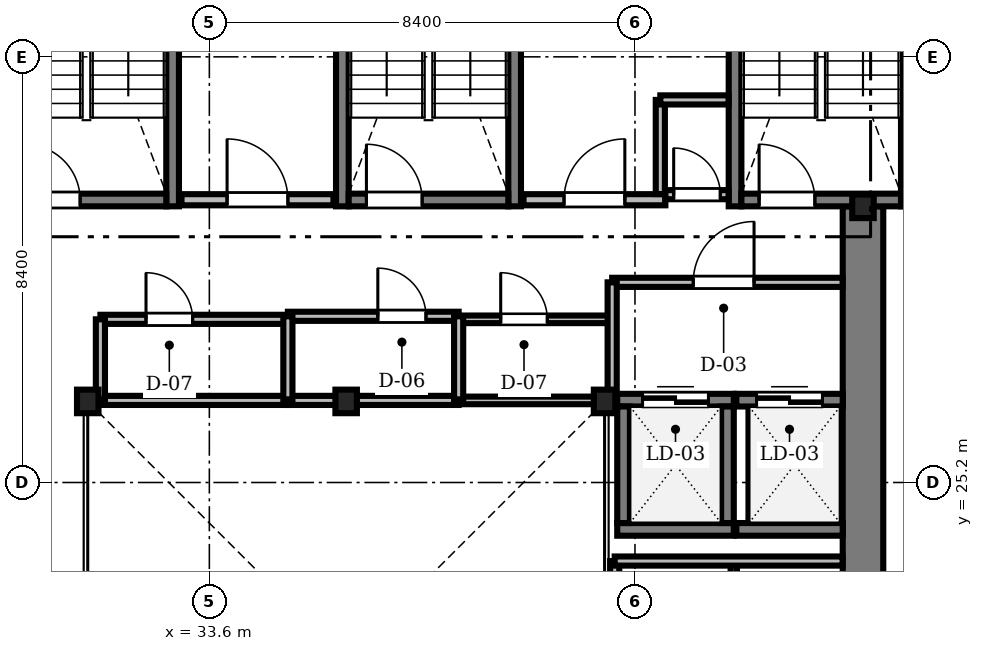
"""IFC4 building model, lengths in metres.
Left out: names, types, materials, properties, quantities, classifications, styles, units other than length and angle.
Written with IfcOpenShell. Run it as: python <this file> out.ifc"""

import sys

from ifc_helpers import new_model, si_unit, direction, frame, frame_2d, origin, origin_2d, place, context, subcontext, project, spatial, rectangle, i_section, extrude, source, transform, mapped, element, fill, save


model = new_model("IFC4")
c1 = context("Model", 3, precision=1e-05, world=origin(), true_north=direction((0.0, 1.0)))
c2 = subcontext(c1, "Body", "Model", "MODEL_VIEW")
j1 = project(units=[si_unit("LENGTHUNIT", "METRE"), si_unit("PLANEANGLEUNIT", "RADIAN")], contexts=[c1])
p1 = place(None, origin())
s1 = spatial("IfcSite", under=j1, at=p1, CompositionType="ELEMENT")
p2 = place(p1, origin())
s2 = spatial("IfcBuilding", under=s1, at=p2, CompositionType="ELEMENT")
p3 = place(p2, frame((0.0, 0.0, 159.4)))
s3 = spatial("IfcBuildingStorey", under=s2, at=p3, CompositionType="ELEMENT", Elevation=159.4)
m1 = source(origin(), c2, "Body", "SweptSolid", [
    extrude(rectangle(XDim=13.15, YDim=0.8, at=frame_2d((6.575, 0.0))), origin(), (0.0, 0.0, 1.0), 3.46),
])
p4 = place(p3, frame((46.5, 17.5, 0.0), z_axis=(0.0, 0.0, 1.0), x_axis=(0.0, 1.0, 0.0)))
e1 = element("IfcWall", 1, at=p4, inside=s3, PredefinedType="SHEAR", context=c2, shape_type="MappedRepresentation", body=[
    mapped(m1, transform((0.0, 0.0, 0.0), scale=1.0)),
])
m2 = source(origin(), c2, "Body", "SweptSolid", [
    extrude(i_section(OverallWidth=0.424, OverallDepth=0.465, WebThickness=0.035, FlangeThickness=0.056, FilletRadius=0.015, at=origin_2d()), origin(), (0.0, 0.0, 1.0), 3.46),
])
for number, where, z_axis, x_axis in (
    (2, (41.4, 26.8, 0.0), (0.0, 0.0, 1.0), (1.0, 0.0, 0.0)),
    (3, (36.3, 26.8, 0.0), (0.0, 0.0, 1.0), (1.0, 0.0, 0.0)),
    (4, (31.2, 26.8, 0.0), (0.0, 0.0, 1.0), (1.0, 0.0, 0.0)),
    (5, (46.5, 30.65, 0.0), (0.0, 0.0, 1.0), (1.0, 0.0, 0.0)),
):
    element("IfcColumn", number, at=place(p3, frame(where, z_axis=z_axis, x_axis=x_axis)), inside=s3, PredefinedType="COLUMN", context=c2, shape_type="MappedRepresentation", body=[
        mapped(m2, transform((0.0, 0.0, 0.0), scale=1.0)),
    ])
m3 = source(origin(), c2, "Body", "SweptSolid", [
    extrude(rectangle(XDim=9.25, YDim=0.25, at=frame_2d((4.625, 0.0))), origin(), (0.0, 0.0, 1.0), 3.5),
])
p5 = place(p3, frame((32.875, 30.65, 0.0), z_axis=(0.0, 0.0, 1.0), x_axis=(0.0, 1.0, 0.0)))
e6 = element("IfcWall", 6, at=p5, inside=s3, PredefinedType="SOLIDWALL", context=c2, shape_type="MappedRepresentation", body=[
    mapped(m3, transform((0.0, 0.0, 0.0), scale=1.0)),
])
m4 = source(origin(), c2, "Body", "SweptSolid", [
    extrude(rectangle(XDim=3.15, YDim=0.25, at=frame_2d((1.575, 0.0))), origin(), (0.0, 0.0, 1.0), 3.5),
])
p6 = place(p3, frame((29.6, 30.775, 0.0), z_axis=(0.0, 0.0, 1.0), x_axis=(1.0, 0.0, 0.0)))
e7 = element("IfcWall", 7, at=p6, inside=s3, PredefinedType="SOLIDWALL", context=c2, shape_type="MappedRepresentation", body=[
    mapped(m4, transform((0.0, 0.0, 0.0), scale=1.0)),
])
m5 = source(origin(), c2, "Body", "SweptSolid", [
    extrude(rectangle(XDim=1.1, YDim=2.2, at=frame_2d((0.55, 1.1))), frame((0.0, 0.135, 0.0), z_axis=(0.0, -1.0, 0.0), x_axis=(1.0, 0.0, 0.0)), (0.0, 0.0, 1.0), 0.27),
])
p7 = place(p6, frame((0.35, 0.0, 0.0)))
e8 = element("IfcOpeningElement", 8, at=p7, cuts=e7, PredefinedType="OPENING", context=c2, shape_type="MappedRepresentation", body=[
    mapped(m5, transform((0.0, 0.0, 0.0), scale=1.0)),
])
for number, where, z_axis, x_axis in (
    (9, (36.225, 30.65, 0.0), (0.0, 0.0, 1.0), (0.0, 1.0, 0.0)),
    (10, (39.625, 30.65, 0.0), (0.0, 0.0, 1.0), (0.0, 1.0, 0.0)),
):
    element("IfcWall", number, at=place(p3, frame(where, z_axis=z_axis, x_axis=x_axis)), inside=s3, PredefinedType="SOLIDWALL", context=c2, shape_type="MappedRepresentation", body=[
        mapped(m3, transform((0.0, 0.0, 0.0), scale=1.0)),
    ])
p8 = place(p3, frame((36.35, 30.775, 0.0), z_axis=(0.0, 0.0, 1.0), x_axis=(1.0, 0.0, 0.0)))
e11 = element("IfcWall", 11, at=p8, inside=s3, PredefinedType="SOLIDWALL", context=c2, shape_type="MappedRepresentation", body=[
    mapped(m4, transform((0.0, 0.0, 0.0), scale=1.0)),
])
p9 = place(p8, frame((0.35, 0.0, 0.0)))
e12 = element("IfcOpeningElement", 12, at=p9, cuts=e11, PredefinedType="OPENING", context=c2, shape_type="MappedRepresentation", body=[
    mapped(m5, transform((0.0, 0.0, 0.0), scale=1.0)),
])
for number, where, z_axis, x_axis in (
    (13, (43.975, 30.65, 0.0), (0.0, 0.0, 1.0), (0.0, 1.0, 0.0)),
    (14, (47.375, 30.65, 0.0), (0.0, 0.0, 1.0), (0.0, 1.0, 0.0)),
):
    element("IfcWall", number, at=place(p3, frame(where, z_axis=z_axis, x_axis=x_axis)), inside=s3, PredefinedType="SOLIDWALL", context=c2, shape_type="MappedRepresentation", body=[
        mapped(m3, transform((0.0, 0.0, 0.0), scale=1.0)),
    ])
p10 = place(p3, frame((44.1, 30.775, 0.0), z_axis=(0.0, 0.0, 1.0), x_axis=(1.0, 0.0, 0.0)))
e15 = element("IfcWall", 15, at=p10, inside=s3, PredefinedType="SOLIDWALL", context=c2, shape_type="MappedRepresentation", body=[
    mapped(m4, transform((0.0, 0.0, 0.0), scale=1.0)),
])
p11 = place(p10, frame((0.35, 0.0, 0.0)))
e16 = element("IfcOpeningElement", 16, at=p11, cuts=e15, PredefinedType="OPENING", context=c2, shape_type="MappedRepresentation", body=[
    mapped(m5, transform((0.0, 0.0, 0.0), scale=1.0)),
])
m6 = source(origin(), c2, "Body", "SweptSolid", [
    extrude(rectangle(XDim=3.0, YDim=0.22, at=frame_2d((1.5, 0.0))), origin(), (0.0, 0.0, 1.0), 3.46),
])
p12 = place(p3, frame((33.05, 30.78, 0.0), z_axis=(0.0, 0.0, 1.0), x_axis=(1.0, 0.0, 0.0)))
e17 = element("IfcWall", 17, at=p12, inside=s3, PredefinedType="SOLIDWALL", context=c2, shape_type="MappedRepresentation", body=[
    mapped(m6, transform((0.0, 0.0, 0.0), scale=1.0)),
])
m7 = source(origin(), c2, "Body", "SweptSolid", [
    extrude(rectangle(XDim=1.2, YDim=2.2, at=frame_2d((0.6, 1.1))), frame((0.0, 0.12, 0.0), z_axis=(0.0, -1.0, 0.0), x_axis=(1.0, 0.0, 0.0)), (0.0, 0.0, 1.0), 0.24),
])
p13 = place(p12, frame((0.9, 0.0, 0.0)))
e18 = element("IfcOpeningElement", 18, at=p13, cuts=e17, PredefinedType="OPENING", context=c2, shape_type="MappedRepresentation", body=[
    mapped(m7, transform((0.0, 0.0, 0.0), scale=1.0)),
])
m8 = source(origin(), c2, "Body", "SweptSolid", [
    extrude(rectangle(XDim=2.8, YDim=0.22, at=frame_2d((1.4, 0.0))), origin(), (0.0, 0.0, 1.0), 3.46),
])
p14 = place(p3, frame((39.8, 30.78, 0.0), z_axis=(0.0, 0.0, 1.0), x_axis=(1.0, 0.0, 0.0)))
e19 = element("IfcWall", 19, at=p14, inside=s3, PredefinedType="SOLIDWALL", context=c2, shape_type="MappedRepresentation", body=[
    mapped(m8, transform((0.0, 0.0, 0.0), scale=1.0)),
])
p15 = place(p14, frame((0.8, 0.0, 0.0)))
e20 = element("IfcOpeningElement", 20, at=p15, cuts=e19, PredefinedType="OPENING", context=c2, shape_type="MappedRepresentation", body=[
    mapped(m7, transform((0.0, 0.0, 0.0), scale=1.0)),
])
m9 = source(origin(), c2, "Body", "SweptSolid", [
    extrude(rectangle(XDim=2.3, YDim=0.25, at=frame_2d((1.15, 0.0))), origin(), (0.0, 0.0, 1.0), 3.46),
])
p16 = place(p3, frame((41.65, 24.275, 0.0), z_axis=(0.0, 0.0, 1.0), x_axis=(1.0, 0.0, 0.0)))
e21 = element("IfcWall", 21, at=p16, inside=s3, PredefinedType="SOLIDWALL", context=c2, shape_type="MappedRepresentation", body=[
    mapped(m9, transform((0.0, 0.0, 0.0), scale=1.0)),
])
p17 = place(p3, frame((41.65, 26.825, 0.0), z_axis=(0.0, 0.0, 1.0), x_axis=(1.0, 0.0, 0.0)))
e22 = element("IfcWall", 22, at=p17, inside=s3, PredefinedType="SOLIDWALL", context=c2, shape_type="MappedRepresentation", body=[
    mapped(m9, transform((0.0, 0.0, 0.0), scale=1.0)),
])
m10 = source(origin(), c2, "Body", "SweptSolid", [
    extrude(rectangle(XDim=1.3, YDim=2.3, at=frame_2d((0.65, 1.15))), frame((0.0, 0.135, 0.0), z_axis=(0.0, -1.0, 0.0), x_axis=(1.0, 0.0, 0.0)), (0.0, 0.0, 1.0), 0.27),
])
p18 = place(p17, frame((0.5, 0.0, 0.0)))
e23 = element("IfcOpeningElement", 23, at=p18, cuts=e22, PredefinedType="OPENING", context=c2, shape_type="MappedRepresentation", body=[
    mapped(m10, transform((0.0, 0.0, 0.0), scale=1.0)),
])
for number, where, z_axis, x_axis in (
    (24, (41.775, 24.4, 0.0), (0.0, 0.0, 1.0), (0.0, 1.0, 0.0)),
    (25, (43.825, 24.4, 0.0), (0.0, 0.0, 1.0), (0.0, 1.0, 0.0)),
):
    element("IfcWall", number, at=place(p3, frame(where, z_axis=z_axis, x_axis=x_axis)), inside=s3, PredefinedType="SOLIDWALL", context=c2, shape_type="MappedRepresentation", body=[
        mapped(m9, transform((0.0, 0.0, 0.0), scale=1.0)),
    ])
m11 = source(origin(), c2, "Body", "SweptSolid", [
    extrude(rectangle(XDim=2.1, YDim=0.25, at=frame_2d((1.05, 0.0))), origin(), (0.0, 0.0, 1.0), 3.46),
])
p19 = place(p3, frame((44.0, 24.275, 0.0), z_axis=(0.0, 0.0, 1.0), x_axis=(1.0, 0.0, 0.0)))
e26 = element("IfcWall", 26, at=p19, inside=s3, PredefinedType="SOLIDWALL", context=c2, shape_type="MappedRepresentation", body=[
    mapped(m11, transform((0.0, 0.0, 0.0), scale=1.0)),
])
p20 = place(p3, frame((44.0, 26.825, 0.0), z_axis=(0.0, 0.0, 1.0), x_axis=(1.0, 0.0, 0.0)))
e27 = element("IfcWall", 27, at=p20, inside=s3, PredefinedType="SOLIDWALL", context=c2, shape_type="MappedRepresentation", body=[
    mapped(m11, transform((0.0, 0.0, 0.0), scale=1.0)),
])
p21 = place(p20, frame((0.4, 0.0, 0.0)))
e28 = element("IfcOpeningElement", 28, at=p21, cuts=e27, PredefinedType="OPENING", context=c2, shape_type="MappedRepresentation", body=[
    mapped(m10, transform((0.0, 0.0, 0.0), scale=1.0)),
])
m12 = source(origin(), c2, "Body", "SweptSolid", [
    extrude(rectangle(XDim=4.548, YDim=0.18, at=frame_2d((2.274, 0.0))), origin(), (0.0, 0.0, 1.0), 3.092),
])
p22 = place(p3, frame((41.55, 29.15, 0.0), z_axis=(0.0, 0.0, 1.0), x_axis=(1.0, 0.0, 0.0)))
e29 = element("IfcWall", 29, at=p22, inside=s3, PredefinedType="PARTITIONING", context=c2, shape_type="MappedRepresentation", body=[
    mapped(m12, transform((0.0, 0.0, 0.0), scale=1.0)),
])
m13 = source(origin(), c2, "Body", "SweptSolid", [
    extrude(rectangle(XDim=1.2, YDim=2.2, at=frame_2d((0.6, 1.1))), frame((0.0, 0.1, 0.0), z_axis=(0.0, -1.0, 0.0), x_axis=(1.0, 0.0, 0.0)), (0.0, 0.0, 1.0), 0.2),
])
p23 = place(p22, frame((1.6, 0.0, 0.0)))
e30 = element("IfcOpeningElement", 30, at=p23, cuts=e29, PredefinedType="OPENING", context=c2, shape_type="MappedRepresentation", body=[
    mapped(m13, transform((0.0, 0.0, 0.0), scale=1.0)),
])
m14 = source(origin(), c2, "Body", "SweptSolid", [
    extrude(rectangle(XDim=3.7, YDim=0.18, at=frame_2d((1.85, 0.0))), origin(), (0.0, 0.0, 1.0), 3.092),
])
p24 = place(p3, frame((31.45, 28.42, 0.0), z_axis=(0.0, 0.0, 1.0), x_axis=(1.0, 0.0, 0.0)))
e31 = element("IfcWall", 31, at=p24, inside=s3, PredefinedType="PARTITIONING", context=c2, shape_type="MappedRepresentation", body=[
    mapped(m14, transform((0.0, 0.0, 0.0), scale=1.0)),
])
m15 = source(origin(), c2, "Body", "SweptSolid", [
    extrude(rectangle(XDim=0.92, YDim=2.1, at=frame_2d((0.46, 1.05))), frame((0.0, 0.1, 0.0), z_axis=(0.0, -1.0, 0.0), x_axis=(1.0, 0.0, 0.0)), (0.0, 0.0, 1.0), 0.2),
])
p25 = place(p24, frame((0.9, 0.0, 0.0)))
e32 = element("IfcOpeningElement", 32, at=p25, cuts=e31, PredefinedType="OPENING", context=c2, shape_type="MappedRepresentation", body=[
    mapped(m15, transform((0.0, 0.0, 0.0), scale=1.0)),
])
m16 = source(origin(), c2, "Body", "SweptSolid", [
    extrude(rectangle(XDim=3.37, YDim=0.18, at=frame_2d((1.685, 0.0))), origin(), (0.0, 0.0, 1.0), 3.46),
])
p26 = place(p3, frame((35.15, 28.48, 0.0), z_axis=(0.0, 0.0, 1.0), x_axis=(1.0, 0.0, 0.0)))
e33 = element("IfcWall", 33, at=p26, inside=s3, PredefinedType="PARTITIONING", context=c2, shape_type="MappedRepresentation", body=[
    mapped(m16, transform((0.0, 0.0, 0.0), scale=1.0)),
])
m17 = source(origin(), c2, "Body", "SweptSolid", [
    extrude(rectangle(XDim=0.95, YDim=2.15, at=frame_2d((0.475, 1.075))), frame((0.0, 0.1, 0.0), z_axis=(0.0, -1.0, 0.0), x_axis=(1.0, 0.0, 0.0)), (0.0, 0.0, 1.0), 0.2),
])
p27 = place(p26, frame((1.775, 0.0, 0.0)))
e34 = element("IfcOpeningElement", 34, at=p27, cuts=e33, PredefinedType="OPENING", context=c2, shape_type="MappedRepresentation", body=[
    mapped(m17, transform((0.0, 0.0, 0.0), scale=1.0)),
])
m18 = source(origin(), c2, "Body", "SweptSolid", [
    extrude(rectangle(XDim=3.0, YDim=0.15, at=frame_2d((1.5, 0.0))), origin(), (0.0, 0.0, 1.0), 3.46),
])
p28 = place(p3, frame((38.52, 28.42, 0.0), z_axis=(0.0, 0.0, 1.0), x_axis=(1.0, 0.0, 0.0)))
e35 = element("IfcWall", 35, at=p28, inside=s3, PredefinedType="PARTITIONING", context=c2, shape_type="MappedRepresentation", body=[
    mapped(m18, transform((0.0, 0.0, 0.0), scale=1.0)),
])
m19 = source(origin(), c2, "Body", "SweptSolid", [
    extrude(rectangle(XDim=0.92, YDim=2.1, at=frame_2d((0.46, 1.05))), frame((0.0, 0.085, 0.0), z_axis=(0.0, -1.0, 0.0), x_axis=(1.0, 0.0, 0.0)), (0.0, 0.0, 1.0), 0.17),
])
p29 = place(p28, frame((0.83, 0.0, 0.0)))
e36 = element("IfcOpeningElement", 36, at=p29, cuts=e35, PredefinedType="OPENING", context=c2, shape_type="MappedRepresentation", body=[
    mapped(m19, transform((0.0, 0.0, 0.0), scale=1.0)),
])
m20 = source(origin(), c2, "Body", "SweptSolid", [
    extrude(rectangle(XDim=1.248, YDim=0.18, at=frame_2d((0.624, 0.0))), origin(), (0.0, 0.0, 1.0), 3.46),
])
p30 = place(p3, frame((42.6, 30.88, 0.0), z_axis=(0.0, 0.0, 1.0), x_axis=(1.0, 0.0, 0.0)))
e37 = element("IfcWall", 37, at=p30, inside=s3, PredefinedType="PARTITIONING", context=c2, shape_type="MappedRepresentation", body=[
    mapped(m20, transform((0.0, 0.0, 0.0), scale=1.0)),
])
p31 = place(p30, frame((0.164, 0.0, 0.0)))
e38 = element("IfcOpeningElement", 38, at=p31, cuts=e37, PredefinedType="OPENING", context=c2, shape_type="MappedRepresentation", body=[
    mapped(m15, transform((0.0, 0.0, 0.0), scale=1.0)),
])
m21 = source(origin(), c2, "Body", "SweptSolid", [
    extrude(rectangle(XDim=7.15, YDim=0.18, at=frame_2d((3.575, 0.0))), origin(), (0.0, 0.0, 1.0), 2.852),
])
p32 = place(p3, frame((41.6, 16.5, 0.0), z_axis=(0.0, 0.0, 1.0), x_axis=(0.0, 1.0, 0.0)))
e39 = element("IfcWall", 39, at=p32, inside=s3, PredefinedType="PARTITIONING", context=c2, shape_type="MappedRepresentation", body=[
    mapped(m21, transform((0.0, 0.0, 0.0), scale=1.0)),
])
m22 = source(origin(), c2, "Body", "SweptSolid", [
    extrude(rectangle(XDim=7.15, YDim=0.125, at=frame_2d((3.575, 0.0))), origin(), (0.0, 0.0, 1.0), 2.852),
])
p33 = place(p3, frame((43.95, 16.5, 0.0), z_axis=(0.0, 0.0, 1.0), x_axis=(0.0, 1.0, 0.0)))
e40 = element("IfcWall", 40, at=p33, inside=s3, PredefinedType="PARTITIONING", context=c2, shape_type="MappedRepresentation", body=[
    mapped(m22, transform((0.0, 0.0, 0.0), scale=1.0)),
])
m23 = source(origin(), c2, "Body", "SweptSolid", [
    extrude(rectangle(XDim=4.498, YDim=0.18, at=frame_2d((2.249, 0.0))), origin(), (0.0, 0.0, 1.0), 3.46),
])
p34 = place(p3, frame((41.6, 23.65, 0.0), z_axis=(0.0, 0.0, 1.0), x_axis=(1.0, 0.0, 0.0)))
e41 = element("IfcWall", 41, at=p34, inside=s3, PredefinedType="PARTITIONING", context=c2, shape_type="MappedRepresentation", body=[
    mapped(m23, transform((0.0, 0.0, 0.0), scale=1.0)),
])
m24 = source(origin(), c2, "Body", "SweptSolid", [
    extrude(rectangle(XDim=3.7, YDim=0.18, at=frame_2d((1.85, 0.0))), origin(), (0.0, 0.0, 1.0), 3.002),
])
p35 = place(p3, frame((31.45, 26.82, 0.0), z_axis=(0.0, 0.0, 1.0), x_axis=(1.0, 0.0, 0.0)))
e42 = element("IfcWall", 42, at=p35, inside=s3, PredefinedType="PARTITIONING", context=c2, shape_type="MappedRepresentation", body=[
    mapped(m24, transform((0.0, 0.0, 0.0), scale=1.0)),
])
m25 = source(origin(), c2, "Body", "SweptSolid", [
    extrude(rectangle(XDim=3.37, YDim=0.18, at=frame_2d((1.685, 0.0))), origin(), (0.0, 0.0, 1.0), 3.002),
])
p36 = place(p3, frame((35.15, 26.82, 0.0), z_axis=(0.0, 0.0, 1.0), x_axis=(1.0, 0.0, 0.0)))
e43 = element("IfcWall", 43, at=p36, inside=s3, PredefinedType="PARTITIONING", context=c2, shape_type="MappedRepresentation", body=[
    mapped(m25, transform((0.0, 0.0, 0.0), scale=1.0)),
])
m26 = source(origin(), c2, "Body", "SweptSolid", [
    extrude(rectangle(XDim=3.0, YDim=0.15, at=frame_2d((1.5, 0.0))), origin(), (0.0, 0.0, 1.0), 2.852),
])
p37 = place(p3, frame((38.52, 26.82, 0.0), z_axis=(0.0, 0.0, 1.0), x_axis=(1.0, 0.0, 0.0)))
e44 = element("IfcWall", 44, at=p37, inside=s3, PredefinedType="PARTITIONING", context=c2, shape_type="MappedRepresentation", body=[
    mapped(m26, transform((0.0, 0.0, 0.0), scale=1.0)),
])
m27 = source(origin(), c2, "Body", "SweptSolid", [
    extrude(rectangle(XDim=2.35, YDim=0.18, at=frame_2d((1.175, 0.0))), origin(), (0.0, 0.0, 1.0), 2.852),
])
p38 = place(p3, frame((41.55, 26.8, 0.0), z_axis=(0.0, 0.0, 1.0), x_axis=(0.0, 1.0, 0.0)))
e45 = element("IfcWall", 45, at=p38, inside=s3, PredefinedType="PARTITIONING", context=c2, shape_type="MappedRepresentation", body=[
    mapped(m27, transform((0.0, 0.0, 0.0), scale=1.0)),
])
m28 = source(origin(), c2, "Body", "SweptSolid", [
    extrude(rectangle(XDim=1.858, YDim=0.18, at=frame_2d((0.929, 0.0))), origin(), (0.0, 0.0, 1.0), 3.46),
])
p39 = place(p3, frame((42.5, 30.892, 0.0), z_axis=(0.0, 0.0, 1.0), x_axis=(0.0, 1.0, 0.0)))
e46 = element("IfcWall", 46, at=p39, inside=s3, PredefinedType="PARTITIONING", context=c2, shape_type="MappedRepresentation", body=[
    mapped(m28, transform((0.0, 0.0, 0.0), scale=1.0)),
])
m29 = source(origin(), c2, "Body", "SweptSolid", [
    extrude(rectangle(XDim=1.66, YDim=0.18, at=frame_2d((0.83, 0.0))), origin(), (0.0, 0.0, 1.0), 3.002),
])
for number, where, z_axis, x_axis in (
    (47, (35.15, 26.82, 0.0), (0.0, 0.0, 1.0), (0.0, 1.0, 0.0)),
    (48, (38.52, 26.82, 0.0), (0.0, 0.0, 1.0), (0.0, 1.0, 0.0)),
):
    element("IfcWall", number, at=place(p3, frame(where, z_axis=z_axis, x_axis=x_axis)), inside=s3, PredefinedType="PARTITIONING", context=c2, shape_type="MappedRepresentation", body=[
        mapped(m29, transform((0.0, 0.0, 0.0), scale=1.0)),
    ])
m30 = source(origin(), c2, "Body", "SweptSolid", [
    extrude(rectangle(XDim=1.6, YDim=0.18, at=frame_2d((0.8, 0.0))), origin(), (0.0, 0.0, 1.0), 3.002),
])
p40 = place(p3, frame((31.45, 26.82, 0.0), z_axis=(0.0, 0.0, 1.0), x_axis=(0.0, 1.0, 0.0)))
e49 = element("IfcWall", 49, at=p40, inside=s3, PredefinedType="PARTITIONING", context=c2, shape_type="MappedRepresentation", body=[
    mapped(m30, transform((0.0, 0.0, 0.0), scale=1.0)),
])
m31 = source(origin(), c2, "Body", "SweptSolid", [
    extrude(rectangle(XDim=1.348, YDim=0.18, at=frame_2d((0.674, 0.0))), origin(), (0.0, 0.0, 1.0), 3.46),
])
p41 = place(p3, frame((42.5, 32.75, 0.0), z_axis=(0.0, 0.0, 1.0), x_axis=(1.0, 0.0, 0.0)))
e50 = element("IfcWall", 50, at=p41, inside=s3, PredefinedType="PARTITIONING", context=c2, shape_type="MappedRepresentation", body=[
    mapped(m31, transform((0.0, 0.0, 0.0), scale=1.0)),
])
m32 = source(origin(), c2, "Body", "SweptSolid", [
    extrude(rectangle(XDim=1.1, YDim=2.2, at=frame_2d((0.55, 1.1))), frame((0.0, 0.025, 0.0), z_axis=(0.0, -1.0, 0.0), x_axis=(1.0, 0.0, 0.0)), (0.0, 0.0, 1.0), 0.05),
])
p42 = place(p7, origin())
e51 = element("IfcDoor", 51, at=p42, inside=s3, OperationType="SINGLE_SWING_LEFT", PredefinedType="DOOR", context=c2, shape_type="MappedRepresentation", body=[
    mapped(m32, transform((0.0, 0.0, 0.0), scale=1.0)),
])
fill(e8, e51)
p43 = place(p9, origin())
e52 = element("IfcDoor", 52, at=p43, inside=s3, OperationType="SINGLE_SWING_LEFT", PredefinedType="DOOR", context=c2, shape_type="MappedRepresentation", body=[
    mapped(m32, transform((0.0, 0.0, 0.0), scale=1.0)),
])
fill(e12, e52)
p44 = place(p11, origin())
e53 = element("IfcDoor", 53, at=p44, inside=s3, OperationType="SINGLE_SWING_LEFT", PredefinedType="DOOR", context=c2, shape_type="MappedRepresentation", body=[
    mapped(m32, transform((0.0, 0.0, 0.0), scale=1.0)),
])
fill(e16, e53)
m33 = source(origin(), c2, "Body", "SweptSolid", [
    extrude(rectangle(XDim=1.2, YDim=2.2, at=frame_2d((0.6, 1.1))), frame((0.0, 0.025, 0.0), z_axis=(0.0, -1.0, 0.0), x_axis=(1.0, 0.0, 0.0)), (0.0, 0.0, 1.0), 0.05),
])
p45 = place(p13, origin())
e54 = element("IfcDoor", 54, at=p45, inside=s3, OperationType="SINGLE_SWING_LEFT", PredefinedType="DOOR", context=c2, shape_type="MappedRepresentation", body=[
    mapped(m33, transform((0.0, 0.0, 0.0), scale=1.0)),
])
fill(e18, e54)
p46 = place(p15, origin())
e55 = element("IfcDoor", 55, at=p46, inside=s3, OperationType="SINGLE_SWING_RIGHT", PredefinedType="DOOR", context=c2, shape_type="MappedRepresentation", body=[
    mapped(m33, transform((0.0, 0.0, 0.0), scale=1.0)),
])
fill(e20, e55)
m34 = source(origin(), c2, "Body", "SweptSolid", [
    extrude(rectangle(XDim=1.3, YDim=2.3, at=frame_2d((0.65, 1.15))), frame((0.0, 0.025, 0.0), z_axis=(0.0, -1.0, 0.0), x_axis=(1.0, 0.0, 0.0)), (0.0, 0.0, 1.0), 0.05),
])
p47 = place(p18, origin())
e56 = element("IfcDoor", 56, at=p47, inside=s3, OperationType="DOUBLE_DOOR_SLIDING", PredefinedType="DOOR", context=c2, shape_type="MappedRepresentation", body=[
    mapped(m34, transform((0.0, 0.0, 0.0), scale=1.0)),
])
fill(e23, e56)
p48 = place(p21, origin())
e57 = element("IfcDoor", 57, at=p48, inside=s3, OperationType="DOUBLE_DOOR_SLIDING", PredefinedType="DOOR", context=c2, shape_type="MappedRepresentation", body=[
    mapped(m34, transform((0.0, 0.0, 0.0), scale=1.0)),
])
fill(e28, e57)
p49 = place(p23, origin())
e58 = element("IfcDoor", 58, at=p49, inside=s3, OperationType="SINGLE_SWING_RIGHT", PredefinedType="DOOR", context=c2, shape_type="MappedRepresentation", body=[
    mapped(m33, transform((0.0, 0.0, 0.0), scale=1.0)),
])
fill(e30, e58)
m35 = source(origin(), c2, "Body", "SweptSolid", [
    extrude(rectangle(XDim=0.92, YDim=2.1, at=frame_2d((0.46, 1.05))), frame((0.0, 0.025, 0.0), z_axis=(0.0, -1.0, 0.0), x_axis=(1.0, 0.0, 0.0)), (0.0, 0.0, 1.0), 0.05),
])
p50 = place(p25, origin())
e59 = element("IfcDoor", 59, at=p50, inside=s3, OperationType="SINGLE_SWING_LEFT", PredefinedType="DOOR", context=c2, shape_type="MappedRepresentation", body=[
    mapped(m35, transform((0.0, 0.0, 0.0), scale=1.0)),
])
fill(e32, e59)
m36 = source(origin(), c2, "Body", "SweptSolid", [
    extrude(rectangle(XDim=0.95, YDim=2.15, at=frame_2d((0.475, 1.075))), frame((0.0, 0.025, 0.0), z_axis=(0.0, -1.0, 0.0), x_axis=(1.0, 0.0, 0.0)), (0.0, 0.0, 1.0), 0.05),
])
p51 = place(p27, origin())
e60 = element("IfcDoor", 60, at=p51, inside=s3, OperationType="SINGLE_SWING_LEFT", PredefinedType="DOOR", context=c2, shape_type="MappedRepresentation", body=[
    mapped(m36, transform((0.0, 0.0, 0.0), scale=1.0)),
])
fill(e34, e60)
p52 = place(p29, origin())
e61 = element("IfcDoor", 61, at=p52, inside=s3, OperationType="SINGLE_SWING_LEFT", PredefinedType="DOOR", context=c2, shape_type="MappedRepresentation", body=[
    mapped(m35, transform((0.0, 0.0, 0.0), scale=1.0)),
])
fill(e36, e61)
p53 = place(p31, origin())
e62 = element("IfcDoor", 62, at=p53, inside=s3, OperationType="SINGLE_SWING_LEFT", PredefinedType="DOOR", context=c2, shape_type="MappedRepresentation", body=[
    mapped(m35, transform((0.0, 0.0, 0.0), scale=1.0)),
])
fill(e38, e62)
save(model, sys.argv[1])
